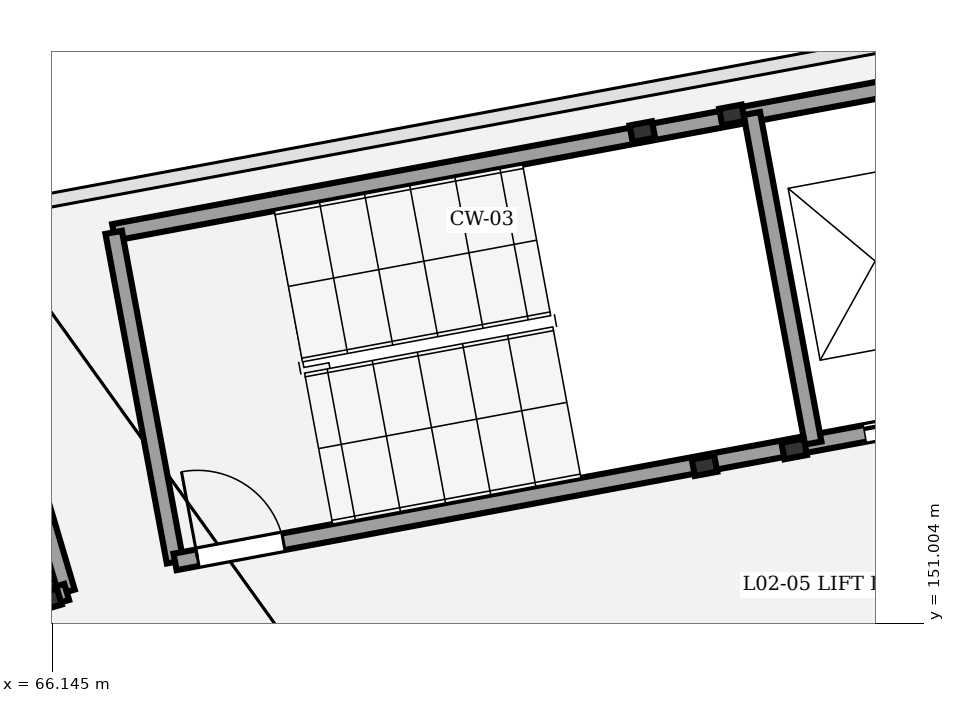
"""IFC4 building model, lengths in metres.
Left out: names, types, materials, properties, quantities, classifications, styles, units other than length and angle.
Written with IfcOpenShell. Run it as: python <this file> out.ifc"""

import sys

from ifc_helpers import new_model, si_unit, direction, frame, frame_2d, origin, origin_2d, place, context, subcontext, project, spatial, rectangle, extrude, element, fill, save


model = new_model("IFC4")
c1 = context("Model", 3, precision=1e-05, world=origin(), true_north=direction((0.0, 1.0)))
c2 = subcontext(c1, "Body", "Model", "MODEL_VIEW")
j1 = project(units=[si_unit("LENGTHUNIT", "METRE"), si_unit("PLANEANGLEUNIT", "RADIAN")], contexts=[c1])
p1 = place(None, origin())
s1 = spatial("IfcSite", under=j1, at=p1, CompositionType="ELEMENT")
p2 = place(p1, origin())
s2 = spatial("IfcBuilding", under=s1, at=p2, CompositionType="ELEMENT")
p3 = place(p2, frame((0.0, 0.0, 10.2)))
s3 = spatial("IfcBuildingStorey", under=s2, at=p3, CompositionType="ELEMENT", Elevation=10.2)
for number, where, z_axis, x_axis in (
    (1, (74.729, 153.078, 0.0), (0.0, 0.0, 1.0), (0.983, 0.183, 0.0)),
    (2, (75.908, 153.298, 0.0), (0.0, 0.0, 1.0), (0.983, 0.183, 0.0)),
    (3, (75.09, 157.692, 0.0), (0.0, 0.0, 1.0), (0.983, 0.183, 0.0)),
    (4, (73.91, 157.473, 0.0), (0.0, 0.0, 1.0), (0.983, 0.183, 0.0)),
):
    element("IfcColumn", number, at=place(p3, frame(where, z_axis=z_axis, x_axis=x_axis)), inside=s3, PredefinedType="COLUMN", context=c2, shape_type="SweptSolid", body=[
        extrude(rectangle(XDim=0.3, YDim=0.22, at=origin_2d()), origin(), (0.0, 0.0, 1.0), 4.5),
    ])
p4 = place(p3, frame((66.955, 156.147, 0.0), z_axis=(0.0, 0.0, 1.0), x_axis=(0.983093434234, 0.183104613723, 0.0)))
e5 = element("IfcWall", 5, at=p4, inside=s3, PredefinedType="SHEAR", context=c2, shape_type="SweptSolid", body=[
    extrude(rectangle(XDim=11.02, YDim=0.22, at=frame_2d((5.51, 0.0))), origin(), (0.0, 0.0, 1.0), 4.25),
])
p5 = place(p3, frame((67.763, 151.811, 0.0), z_axis=(0.0, 0.0, 1.0), x_axis=(-0.183078394814, 0.983098317236, 0.0)))
e6 = element("IfcWall", 6, at=p5, inside=s3, PredefinedType="SHEAR", context=c2, shape_type="SweptSolid", body=[
    extrude(rectangle(XDim=4.41, YDim=0.22, at=frame_2d((2.205, 0.0))), origin(), (0.0, 0.0, 1.0), 4.25),
])
p6 = place(p3, frame((67.763, 151.811, 0.0), z_axis=(0.0, 0.0, 1.0), x_axis=(0.983093434234, 0.183104613723, 0.0)))
e7 = element("IfcWall", 7, at=p6, inside=s3, PredefinedType="SHEAR", context=c2, shape_type="SweptSolid", body=[
    extrude(rectangle(XDim=11.02, YDim=0.22, at=frame_2d((5.51, 0.0))), origin(), (0.0, 0.0, 1.0), 4.25),
])
p7 = place(p6, frame((0.3, 0.0, 0.0)))
e8 = element("IfcOpeningElement", 8, at=p7, cuts=e7, PredefinedType="OPENING", context=c2, shape_type="SweptSolid", body=[
    extrude(rectangle(XDim=1.15, YDim=2.15, at=frame_2d((0.575, 1.075))), frame((0.0, 0.12, 0.0), z_axis=(0.0, -1.0, 0.0), x_axis=(1.0, 0.0, 0.0)), (0.0, 0.0, 1.0), 0.24),
])
p8 = place(p6, frame((9.23, 0.0, 0.0)))
e9 = element("IfcOpeningElement", 9, at=p8, cuts=e7, PredefinedType="OPENING", context=c2, shape_type="SweptSolid", body=[
    extrude(rectangle(XDim=1.1, YDim=2.15, at=frame_2d((0.55, 1.075))), frame((0.0, 0.12, 0.0), z_axis=(0.0, -1.0, 0.0), x_axis=(1.0, 0.0, 0.0)), (0.0, 0.0, 1.0), 0.24),
])
p9 = place(p3, frame((76.158, 153.375, 0.0), z_axis=(0.0, 0.0, 1.0), x_axis=(-0.183078394814, 0.983098317236, 0.0)))
e10 = element("IfcWall", 10, at=p9, inside=s3, PredefinedType="SHEAR", context=c2, shape_type="SweptSolid", body=[
    extrude(rectangle(XDim=4.41, YDim=0.22, at=frame_2d((2.205, 0.0))), origin(), (0.0, 0.0, 1.0), 4.25),
])
p10 = place(p3, frame((66.096, 151.313, 0.0), z_axis=(0.0, 0.0, 1.0), x_axis=(0.958670893355, 0.284517342588, 0.0)))
e11 = element("IfcColumn", 11, at=p10, inside=s3, PredefinedType="COLUMN", context=c2, shape_type="SweptSolid", body=[
    extrude(rectangle(XDim=0.3, YDim=0.22, at=origin_2d()), origin(), (0.0, 0.0, 1.0), 4.5),
])
p11 = place(p3, frame((66.337, 151.416, 0.0), z_axis=(0.0, 0.0, 1.0), x_axis=(-0.284497328872, 0.958676832861, 0.0)))
e12 = element("IfcWall", 12, at=p11, inside=s3, PredefinedType="SHEAR", context=c2, shape_type="SweptSolid", body=[
    extrude(rectangle(XDim=4.41, YDim=0.22, at=frame_2d((2.205, 0.0))), origin(), (0.0, 0.0, 1.0), 4.25),
])
p12 = place(p3, frame((58.15, 148.986, 0.0), z_axis=(0.0, 0.0, 1.0), x_axis=(0.958665631999, 0.284535069937, 0.0)))
e13 = element("IfcWall", 13, at=p12, inside=s3, PredefinedType="SHEAR", context=c2, shape_type="SweptSolid", body=[
    extrude(rectangle(XDim=8.54, YDim=0.22, at=frame_2d((4.27, 0.0))), origin(), (0.0, 0.0, 1.0), 4.25),
])
p13 = place(p12, frame((0.3, 0.0, 0.0)))
e14 = element("IfcOpeningElement", 14, at=p13, cuts=e13, PredefinedType="OPENING", context=c2, shape_type="SweptSolid", body=[
    extrude(rectangle(XDim=1.15, YDim=2.15, at=frame_2d((0.575, 1.075))), frame((0.0, 0.12, 0.0), z_axis=(0.0, -1.0, 0.0), x_axis=(1.0, 0.0, 0.0)), (0.0, 0.0, 1.0), 0.24),
])
p14 = place(p7, origin())
e15 = element("IfcDoor", 15, at=p14, inside=s3, OperationType="SINGLE_SWING_LEFT", PredefinedType="DOOR", context=c2, shape_type="SweptSolid", body=[
    extrude(rectangle(XDim=1.15, YDim=2.15, at=frame_2d((0.575, 1.075))), frame((0.0, 0.025, 0.0), z_axis=(0.0, -1.0, 0.0), x_axis=(1.0, 0.0, 0.0)), (0.0, 0.0, 1.0), 0.05),
])
fill(e8, e15)
p15 = place(p8, origin())
e16 = element("IfcDoor", 16, at=p15, inside=s3, OperationType="DOUBLE_DOOR_SLIDING", PredefinedType="DOOR", context=c2, shape_type="SweptSolid", body=[
    extrude(rectangle(XDim=1.1, YDim=2.15, at=frame_2d((0.55, 1.075))), frame((0.0, 0.025, 0.0), z_axis=(0.0, -1.0, 0.0), x_axis=(1.0, 0.0, 0.0)), (0.0, 0.0, 1.0), 0.05),
])
fill(e9, e16)
save(model, sys.argv[1])
